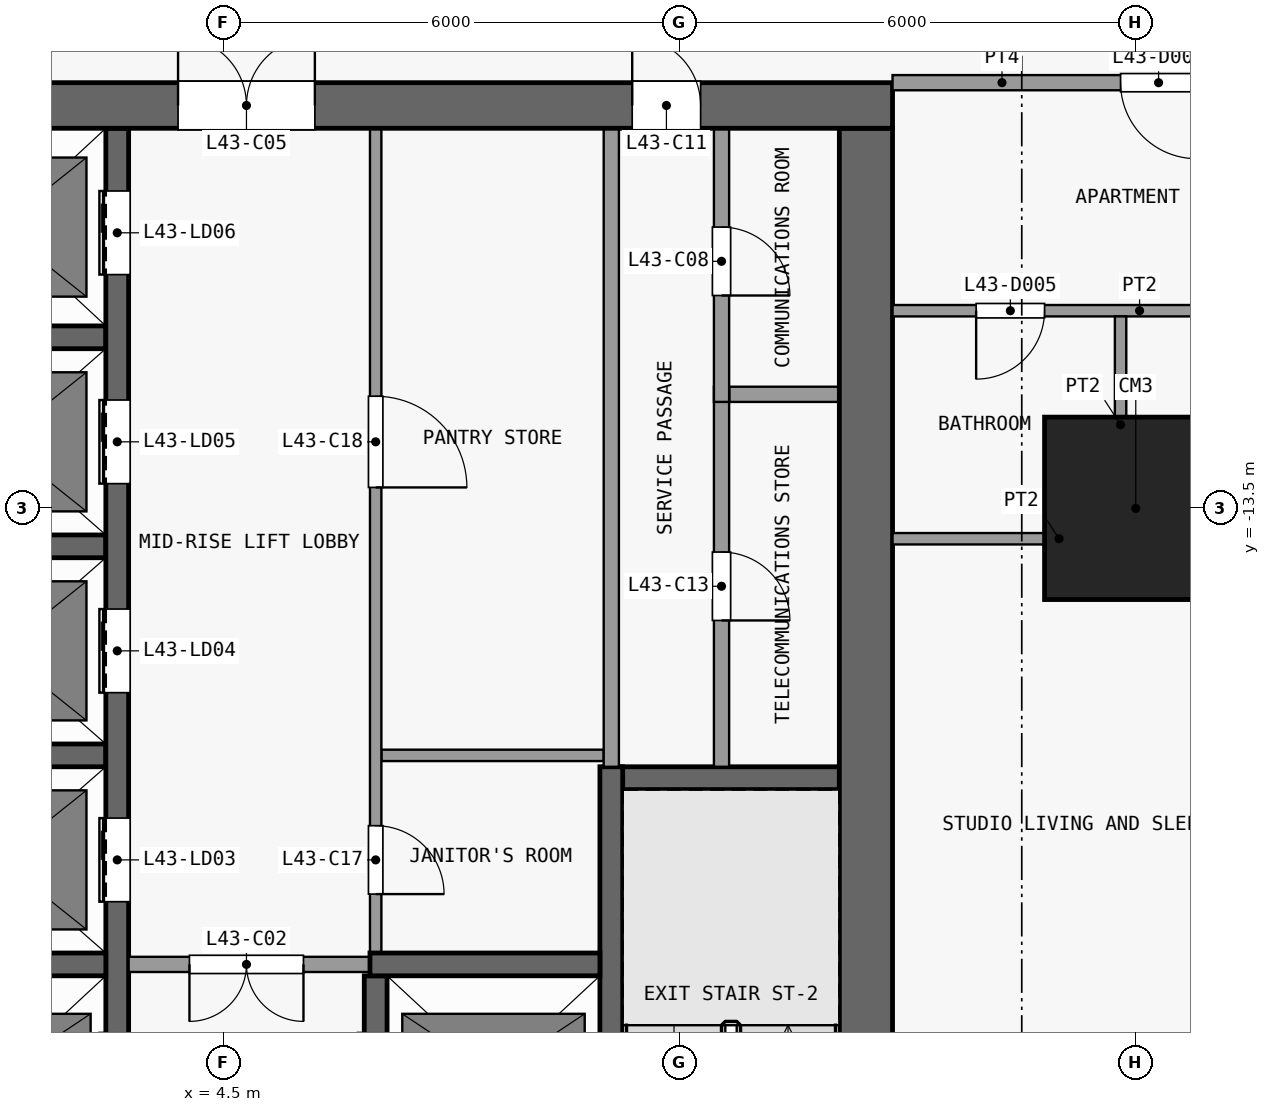
"""IFC4 building model, lengths in metres.
Left out: names, types, materials, properties, quantities, classifications, styles, units other than length and angle.
Written with IfcOpenShell. Run it as: python <this file> out.ifc"""

import sys

from ifc_helpers import new_model, si_unit, direction, frame, frame_2d, origin, origin_2d, place, context, subcontext, project, spatial, rectangle, extrude, element, fill, save


model = new_model("IFC4")
c1 = context("Model", 3, precision=1e-05, world=origin(), true_north=direction((0.0, 1.0)))
c2 = subcontext(c1, "Body", "Model", "MODEL_VIEW")
j1 = project(units=[si_unit("LENGTHUNIT", "METRE"), si_unit("PLANEANGLEUNIT", "RADIAN")], contexts=[c1])
p1 = place(None, origin())
s1 = spatial("IfcSite", under=j1, at=p1, CompositionType="ELEMENT")
p2 = place(p1, origin())
s2 = spatial("IfcBuilding", under=s1, at=p2, CompositionType="ELEMENT")
p3 = place(p2, frame((0.0, 0.0, 174.5)))
s3 = spatial("IfcBuildingStorey", under=s2, at=p3, CompositionType="ELEMENT", Elevation=174.5)
p4 = place(p3, frame((16.5, -13.5, 0.0), z_axis=(0.0, 0.0, 1.0), x_axis=(1.0, 0.0, 0.0)))
e1 = element("IfcColumn", 1, at=p4, inside=s3, PredefinedType="COLUMN", context=c2, shape_type="SweptSolid", body=[
    extrude(rectangle(XDim=2.4, YDim=2.4, at=origin_2d()), origin(), (0.0, 0.0, 1.0), 3.6),
])
p5 = place(p3, frame((-13.3, -8.2, 0.0), z_axis=(0.0, 0.0, 1.0), x_axis=(1.0, 0.0, 0.0)))
e2 = element("IfcWall", 2, at=p5, inside=s3, PredefinedType="SHEAR", context=c2, shape_type="SweptSolid", body=[
    extrude(rectangle(XDim=26.6, YDim=0.6, at=frame_2d((13.3, 0.0))), origin(), (0.0, 0.0, 1.0), 3.3),
])
p6 = place(p5, frame((7.6, 0.0, 0.0)))
e3 = element("IfcOpeningElement", 3, at=p6, cuts=e2, PredefinedType="OPENING", context=c2, shape_type="SweptSolid", body=[
    extrude(rectangle(XDim=1.8, YDim=2.1, at=frame_2d((0.9, 1.05))), frame((0.0, 0.31, 0.0), z_axis=(0.0, -1.0, 0.0), x_axis=(1.0, 0.0, 0.0)), (0.0, 0.0, 1.0), 0.62),
])
p7 = place(p5, frame((17.2, 0.0, 0.0)))
e4 = element("IfcOpeningElement", 4, at=p7, cuts=e2, PredefinedType="OPENING", context=c2, shape_type="SweptSolid", body=[
    extrude(rectangle(XDim=1.8, YDim=2.1, at=frame_2d((0.9, 1.05))), frame((0.0, 0.31, 0.0), z_axis=(0.0, -1.0, 0.0), x_axis=(1.0, 0.0, 0.0)), (0.0, 0.0, 1.0), 0.62),
])
p8 = place(p5, frame((2.525, 0.0, 0.0)))
e5 = element("IfcOpeningElement", 5, at=p8, cuts=e2, PredefinedType="OPENING", context=c2, shape_type="SweptSolid", body=[
    extrude(rectangle(XDim=0.9, YDim=2.1, at=frame_2d((0.45, 1.05))), frame((0.0, 0.31, 0.0), z_axis=(0.0, -1.0, 0.0), x_axis=(1.0, 0.0, 0.0)), (0.0, 0.0, 1.0), 0.62),
])
p9 = place(p5, frame((23.175, 0.0, 0.0)))
e6 = element("IfcOpeningElement", 6, at=p9, cuts=e2, PredefinedType="OPENING", context=c2, shape_type="SweptSolid", body=[
    extrude(rectangle(XDim=0.9, YDim=2.1, at=frame_2d((0.45, 1.05))), frame((0.0, 0.31, 0.0), z_axis=(0.0, -1.0, 0.0), x_axis=(1.0, 0.0, 0.0)), (0.0, 0.0, 1.0), 0.62),
])
p10 = place(p3, frame((12.95, -24.6, 0.0), z_axis=(0.0, 0.0, 1.0), x_axis=(0.0, 1.0, 0.0)))
e7 = element("IfcWall", 7, at=p10, inside=s3, PredefinedType="SHEAR", context=c2, shape_type="SweptSolid", body=[
    extrude(rectangle(XDim=16.1, YDim=0.7, at=frame_2d((8.05, 0.0))), origin(), (0.0, 0.0, 1.0), 3.3),
])
p11 = place(p3, frame((0.15, -19.5, 0.0), z_axis=(0.0, 0.0, 1.0), x_axis=(1.0, 0.0, 0.0)))
e8 = element("IfcWall", 8, at=p11, inside=s3, PredefinedType="SHEAR", context=c2, shape_type="SweptSolid", body=[
    extrude(rectangle(XDim=2.8, YDim=0.3, at=frame_2d((1.4, 0.0))), origin(), (0.0, 0.0, 1.0), 3.3),
])
p12 = place(p3, frame((6.575, -19.5, 0.0), z_axis=(0.0, 0.0, 1.0), x_axis=(-1.0, 0.0, 0.0)))
e9 = element("IfcWall", 9, at=p12, inside=s3, PredefinedType="PARTITIONING", context=c2, shape_type="SweptSolid", body=[
    extrude(rectangle(XDim=3.325, YDim=0.2, at=frame_2d((1.663, 0.0))), origin(), (0.0, 0.0, 1.0), 3.3),
])
p13 = place(p12, frame((1.025, 0.0, 0.0)))
e10 = element("IfcOpeningElement", 10, at=p13, cuts=e9, PredefinedType="OPENING", context=c2, shape_type="SweptSolid", body=[
    extrude(rectangle(XDim=1.5, YDim=2.1, at=frame_2d((0.75, 1.05))), frame((0.0, 0.11, 0.0), z_axis=(0.0, -1.0, 0.0), x_axis=(1.0, 0.0, 0.0)), (0.0, 0.0, 1.0), 0.22),
])
p14 = place(p3, frame((6.425, -19.5, 0.0), z_axis=(0.0, 0.0, 1.0), x_axis=(1.0, 0.0, 0.0)))
e11 = element("IfcWall", 11, at=p14, inside=s3, PredefinedType="SHEAR", context=c2, shape_type="SweptSolid", body=[
    extrude(rectangle(XDim=3.025, YDim=0.3, at=frame_2d((1.512, 0.0))), origin(), (0.0, 0.0, 1.0), 3.3),
])
p15 = place(p3, frame((9.5, -17.05, 0.0), z_axis=(0.0, 0.0, 1.0), x_axis=(1.0, 0.0, 0.0)))
e12 = element("IfcWall", 12, at=p15, inside=s3, PredefinedType="SHEAR", context=c2, shape_type="SweptSolid", body=[
    extrude(rectangle(XDim=3.1, YDim=0.3, at=frame_2d((1.55, 0.0))), origin(), (0.0, 0.0, 1.0), 3.3),
])
p16 = place(p3, frame((0.15, -16.75, 0.0), z_axis=(0.0, 0.0, 1.0), x_axis=(1.0, 0.0, 0.0)))
e13 = element("IfcWall", 13, at=p16, inside=s3, PredefinedType="SHEAR", context=c2, shape_type="SweptSolid", body=[
    extrude(rectangle(XDim=2.8, YDim=0.3, at=frame_2d((1.4, 0.0))), origin(), (0.0, 0.0, 1.0), 3.3),
])
p17 = place(p3, frame((6.575, -16.75, 0.0), z_axis=(0.0, 0.0, 1.0), x_axis=(1.0, 0.0, 0.0)))
e14 = element("IfcWall", 14, at=p17, inside=s3, PredefinedType="PARTITIONING", context=c2, shape_type="SweptSolid", body=[
    extrude(rectangle(XDim=2.925, YDim=0.15, at=frame_2d((1.462, 0.0))), origin(), (0.0, 0.0, 1.0), 3.3),
])
p18 = place(p3, frame((0.15, -14.0, 0.0), z_axis=(0.0, 0.0, 1.0), x_axis=(1.0, 0.0, 0.0)))
e15 = element("IfcWall", 15, at=p18, inside=s3, PredefinedType="SHEAR", context=c2, shape_type="SweptSolid", body=[
    extrude(rectangle(XDim=2.8, YDim=0.3, at=frame_2d((1.4, 0.0))), origin(), (0.0, 0.0, 1.0), 3.3),
])
p19 = place(p3, frame((11.15, -12.0, 0.0), z_axis=(0.0, 0.0, 1.0), x_axis=(1.0, 0.0, 0.0)))
e16 = element("IfcWall", 16, at=p19, inside=s3, PredefinedType="PARTITIONING", context=c2, shape_type="SweptSolid", body=[
    extrude(rectangle(XDim=1.45, YDim=0.2, at=frame_2d((0.725, 0.0))), origin(), (0.0, 0.0, 1.0), 3.3),
])
p20 = place(p3, frame((0.15, -11.25, 0.0), z_axis=(0.0, 0.0, 1.0), x_axis=(1.0, 0.0, 0.0)))
e17 = element("IfcWall", 17, at=p20, inside=s3, PredefinedType="SHEAR", context=c2, shape_type="SweptSolid", body=[
    extrude(rectangle(XDim=2.8, YDim=0.3, at=frame_2d((1.4, 0.0))), origin(), (0.0, 0.0, 1.0), 3.3),
])
p21 = place(p3, frame((3.1, -22.55, 0.0), z_axis=(0.0, 0.0, 1.0), x_axis=(0.0, 1.0, 0.0)))
e18 = element("IfcWall", 18, at=p21, inside=s3, PredefinedType="SHEAR", context=c2, shape_type="SweptSolid", body=[
    extrude(rectangle(XDim=14.05, YDim=0.3, at=frame_2d((7.025, 0.0))), origin(), (0.0, 0.0, 1.0), 3.3),
])
p22 = place(p21, frame((1.05, 0.0, 0.0)))
e19 = element("IfcOpeningElement", 19, at=p22, cuts=e18, PredefinedType="OPENING", context=c2, shape_type="SweptSolid", body=[
    extrude(rectangle(XDim=1.1, YDim=2.1, at=frame_2d((0.55, 1.05))), frame((0.0, 0.16, 0.0), z_axis=(0.0, -1.0, 0.0), x_axis=(1.0, 0.0, 0.0)), (0.0, 0.0, 1.0), 0.32),
])
p23 = place(p21, frame((3.875, 0.0, 0.0)))
e20 = element("IfcOpeningElement", 20, at=p23, cuts=e18, PredefinedType="OPENING", context=c2, shape_type="SweptSolid", body=[
    extrude(rectangle(XDim=1.1, YDim=2.1, at=frame_2d((0.55, 1.05))), frame((0.0, 0.16, 0.0), z_axis=(0.0, -1.0, 0.0), x_axis=(1.0, 0.0, 0.0)), (0.0, 0.0, 1.0), 0.32),
])
p24 = place(p21, frame((6.625, 0.0, 0.0)))
e21 = element("IfcOpeningElement", 21, at=p24, cuts=e18, PredefinedType="OPENING", context=c2, shape_type="SweptSolid", body=[
    extrude(rectangle(XDim=1.1, YDim=2.1, at=frame_2d((0.55, 1.05))), frame((0.0, 0.16, 0.0), z_axis=(0.0, -1.0, 0.0), x_axis=(1.0, 0.0, 0.0)), (0.0, 0.0, 1.0), 0.32),
])
p25 = place(p21, frame((9.375, 0.0, 0.0)))
e22 = element("IfcOpeningElement", 22, at=p25, cuts=e18, PredefinedType="OPENING", context=c2, shape_type="SweptSolid", body=[
    extrude(rectangle(XDim=1.1, YDim=2.1, at=frame_2d((0.55, 1.05))), frame((0.0, 0.16, 0.0), z_axis=(0.0, -1.0, 0.0), x_axis=(1.0, 0.0, 0.0)), (0.0, 0.0, 1.0), 0.32),
])
p26 = place(p21, frame((12.125, 0.0, 0.0)))
e23 = element("IfcOpeningElement", 23, at=p26, cuts=e18, PredefinedType="OPENING", context=c2, shape_type="SweptSolid", body=[
    extrude(rectangle(XDim=1.1, YDim=2.1, at=frame_2d((0.55, 1.05))), frame((0.0, 0.16, 0.0), z_axis=(0.0, -1.0, 0.0), x_axis=(1.0, 0.0, 0.0)), (0.0, 0.0, 1.0), 0.32),
])
p27 = place(p3, frame((6.5, -22.25, 0.0), z_axis=(0.0, 0.0, 1.0), x_axis=(0.0, 1.0, 0.0)))
e24 = element("IfcWall", 24, at=p27, inside=s3, PredefinedType="SHEAR", context=c2, shape_type="SweptSolid", body=[
    extrude(rectangle(XDim=2.6, YDim=0.3, at=frame_2d((1.3, 0.0))), origin(), (0.0, 0.0, 1.0), 3.3),
])
p28 = place(p27, frame((0.75, 0.0, 0.0)))
e25 = element("IfcOpeningElement", 25, at=p28, cuts=e24, PredefinedType="OPENING", context=c2, shape_type="SweptSolid", body=[
    extrude(rectangle(XDim=1.1, YDim=2.1, at=frame_2d((0.55, 1.05))), frame((0.0, 0.16, 0.0), z_axis=(0.0, -1.0, 0.0), x_axis=(1.0, 0.0, 0.0)), (0.0, 0.0, 1.0), 0.32),
])
p29 = place(p3, frame((6.5, -8.5, 0.0), z_axis=(0.0, 0.0, 1.0), x_axis=(0.0, -1.0, 0.0)))
e26 = element("IfcWall", 26, at=p29, inside=s3, PredefinedType="PARTITIONING", context=c2, shape_type="SweptSolid", body=[
    extrude(rectangle(XDim=10.85, YDim=0.15, at=frame_2d((5.425, 0.0))), origin(), (0.0, 0.0, 1.0), 3.3),
])
p30 = place(p29, frame((9.175, 0.0, 0.0)))
e27 = element("IfcOpeningElement", 27, at=p30, cuts=e26, PredefinedType="OPENING", context=c2, shape_type="SweptSolid", body=[
    extrude(rectangle(XDim=0.9, YDim=2.1, at=frame_2d((0.45, 1.05))), frame((0.0, 0.085, 0.0), z_axis=(0.0, -1.0, 0.0), x_axis=(1.0, 0.0, 0.0)), (0.0, 0.0, 1.0), 0.17),
])
p31 = place(p29, frame((3.525, 0.0, 0.0)))
e28 = element("IfcOpeningElement", 28, at=p31, cuts=e26, PredefinedType="OPENING", context=c2, shape_type="SweptSolid", body=[
    extrude(rectangle(XDim=1.2, YDim=2.1, at=frame_2d((0.6, 1.05))), frame((0.0, 0.085, 0.0), z_axis=(0.0, -1.0, 0.0), x_axis=(1.0, 0.0, 0.0)), (0.0, 0.0, 1.0), 0.17),
])
p32 = place(p3, frame((9.6, -16.9, 0.0), z_axis=(0.0, 0.0, 1.0), x_axis=(0.0, -1.0, 0.0)))
e29 = element("IfcWall", 29, at=p32, inside=s3, PredefinedType="SHEAR", context=c2, shape_type="SweptSolid", body=[
    extrude(rectangle(XDim=7.7, YDim=0.3, at=frame_2d((3.85, 0.0))), origin(), (0.0, 0.0, 1.0), 3.3),
])
p33 = place(p32, frame((6.5, 0.0, 0.0)))
e30 = element("IfcOpeningElement", 30, at=p33, cuts=e29, PredefinedType="OPENING", context=c2, shape_type="SweptSolid", body=[
    extrude(rectangle(XDim=1.1, YDim=2.1, at=frame_2d((0.55, 1.05))), frame((0.0, 0.16, 0.0), z_axis=(0.0, -1.0, 0.0), x_axis=(1.0, 0.0, 0.0)), (0.0, 0.0, 1.0), 0.32),
])
p34 = place(p3, frame((9.6, -16.9, 0.0), z_axis=(0.0, 0.0, 1.0), x_axis=(0.0, 1.0, 0.0)))
e31 = element("IfcWall", 31, at=p34, inside=s3, PredefinedType="PARTITIONING", context=c2, shape_type="SweptSolid", body=[
    extrude(rectangle(XDim=8.4, YDim=0.2, at=frame_2d((4.2, 0.0))), origin(), (0.0, 0.0, 1.0), 3.3),
])
p35 = place(p3, frame((11.05, -11.9, 0.0), z_axis=(0.0, 0.0, 1.0), x_axis=(0.0, -1.0, 0.0)))
e32 = element("IfcWall", 32, at=p35, inside=s3, PredefinedType="PARTITIONING", context=c2, shape_type="SweptSolid", body=[
    extrude(rectangle(XDim=5.0, YDim=0.2, at=frame_2d((2.5, 0.0))), origin(), (0.0, 0.0, 1.0), 3.3),
])
p36 = place(p35, frame((2.175, 0.0, 0.0)))
e33 = element("IfcOpeningElement", 33, at=p36, cuts=e32, PredefinedType="OPENING", context=c2, shape_type="SweptSolid", body=[
    extrude(rectangle(XDim=0.9, YDim=2.1, at=frame_2d((0.45, 1.05))), frame((0.0, 0.11, 0.0), z_axis=(0.0, -1.0, 0.0), x_axis=(1.0, 0.0, 0.0)), (0.0, 0.0, 1.0), 0.22),
])
p37 = place(p3, frame((11.05, -8.5, 0.0), z_axis=(0.0, 0.0, 1.0), x_axis=(0.0, -1.0, 0.0)))
e34 = element("IfcWall", 34, at=p37, inside=s3, PredefinedType="PARTITIONING", context=c2, shape_type="SweptSolid", body=[
    extrude(rectangle(XDim=3.6, YDim=0.2, at=frame_2d((1.8, 0.0))), origin(), (0.0, 0.0, 1.0), 3.3),
])
p38 = place(p37, frame((1.3, 0.0, 0.0)))
e35 = element("IfcOpeningElement", 35, at=p38, cuts=e34, PredefinedType="OPENING", context=c2, shape_type="SweptSolid", body=[
    extrude(rectangle(XDim=0.9, YDim=2.1, at=frame_2d((0.45, 1.05))), frame((0.0, 0.11, 0.0), z_axis=(0.0, -1.0, 0.0), x_axis=(1.0, 0.0, 0.0)), (0.0, 0.0, 1.0), 0.22),
])
p39 = place(p3, frame((13.3, -13.9, 0.0), z_axis=(0.0, 0.0, 1.0), x_axis=(1.0, 0.0, 0.0)))
e36 = element("IfcWall", 36, at=p39, inside=s3, PredefinedType="PARTITIONING", context=c2, shape_type="SweptSolid", body=[
    extrude(rectangle(XDim=5.962, YDim=0.15, at=frame_2d((2.981, 0.0))), origin(), (0.0, 0.0, 1.0), 3.3),
])
p40 = place(p39, frame((4.5, 0.0, 0.0)))
e37 = element("IfcOpeningElement", 37, at=p40, cuts=e36, PredefinedType="OPENING", context=c2, shape_type="SweptSolid", body=[
    extrude(rectangle(XDim=0.9, YDim=2.1, at=frame_2d((0.45, 1.05))), frame((0.0, 0.085, 0.0), z_axis=(0.0, -1.0, 0.0), x_axis=(1.0, 0.0, 0.0)), (0.0, 0.0, 1.0), 0.17),
])
p41 = place(p3, frame((13.3, -10.9, 0.0), z_axis=(0.0, 0.0, 1.0), x_axis=(1.0, 0.0, 0.0)))
e38 = element("IfcWall", 38, at=p41, inside=s3, PredefinedType="PARTITIONING", context=c2, shape_type="SweptSolid", body=[
    extrude(rectangle(XDim=6.863, YDim=0.15, at=frame_2d((3.431, 0.0))), origin(), (0.0, 0.0, 1.0), 3.3),
])
p42 = place(p41, frame((1.1, 0.0, 0.0)))
e39 = element("IfcOpeningElement", 39, at=p42, cuts=e38, PredefinedType="OPENING", context=c2, shape_type="SweptSolid", body=[
    extrude(rectangle(XDim=0.9, YDim=2.1, at=frame_2d((0.45, 1.05))), frame((0.0, 0.085, 0.0), z_axis=(0.0, -1.0, 0.0), x_axis=(1.0, 0.0, 0.0)), (0.0, 0.0, 1.0), 0.17),
])
p43 = place(p41, frame((4.5, 0.0, 0.0)))
e40 = element("IfcOpeningElement", 40, at=p43, cuts=e38, PredefinedType="OPENING", context=c2, shape_type="SweptSolid", body=[
    extrude(rectangle(XDim=0.9, YDim=2.1, at=frame_2d((0.45, 1.05))), frame((0.0, 0.085, 0.0), z_axis=(0.0, -1.0, 0.0), x_axis=(1.0, 0.0, 0.0)), (0.0, 0.0, 1.0), 0.17),
])
p44 = place(p3, frame((13.3, -7.9, 0.0), z_axis=(0.0, 0.0, 1.0), x_axis=(1.0, 0.0, 0.0)))
e41 = element("IfcWall", 41, at=p44, inside=s3, PredefinedType="PARTITIONING", context=c2, shape_type="SweptSolid", body=[
    extrude(rectangle(XDim=6.863, YDim=0.2, at=frame_2d((3.431, 0.0))), origin(), (0.0, 0.0, 1.0), 3.3),
])
p45 = place(p44, frame((3.0, 0.0, 0.0)))
e42 = element("IfcOpeningElement", 42, at=p45, cuts=e41, PredefinedType="OPENING", context=c2, shape_type="SweptSolid", body=[
    extrude(rectangle(XDim=1.0, YDim=2.1, at=frame_2d((0.5, 1.05))), frame((0.0, 0.11, 0.0), z_axis=(0.0, -1.0, 0.0), x_axis=(1.0, 0.0, 0.0)), (0.0, 0.0, 1.0), 0.22),
])
p46 = place(p3, frame((16.3, -13.825, 0.0), z_axis=(0.0, 0.0, 1.0), x_axis=(0.0, 1.0, 0.0)))
e43 = element("IfcWall", 43, at=p46, inside=s3, PredefinedType="PARTITIONING", context=c2, shape_type="SweptSolid", body=[
    extrude(rectangle(XDim=2.85, YDim=0.15, at=frame_2d((1.425, 0.0))), origin(), (0.0, 0.0, 1.0), 3.3),
])
p47 = place(p23, origin())
e44 = element("IfcDoor", 44, at=p47, inside=s3, OperationType="DOUBLE_DOOR_SLIDING", PredefinedType="DOOR", context=c2, shape_type="SweptSolid", body=[
    extrude(rectangle(XDim=1.1, YDim=2.1, at=frame_2d((0.55, 1.05))), frame((0.0, 0.025, 0.0), z_axis=(0.0, -1.0, 0.0), x_axis=(1.0, 0.0, 0.0)), (0.0, 0.0, 1.0), 0.05),
])
fill(e20, e44)
p48 = place(p24, origin())
e45 = element("IfcDoor", 45, at=p48, inside=s3, OperationType="DOUBLE_DOOR_SLIDING", PredefinedType="DOOR", context=c2, shape_type="SweptSolid", body=[
    extrude(rectangle(XDim=1.1, YDim=2.1, at=frame_2d((0.55, 1.05))), frame((0.0, 0.025, 0.0), z_axis=(0.0, -1.0, 0.0), x_axis=(1.0, 0.0, 0.0)), (0.0, 0.0, 1.0), 0.05),
])
fill(e21, e45)
p49 = place(p25, origin())
e46 = element("IfcDoor", 46, at=p49, inside=s3, OperationType="DOUBLE_DOOR_SLIDING", PredefinedType="DOOR", context=c2, shape_type="SweptSolid", body=[
    extrude(rectangle(XDim=1.1, YDim=2.1, at=frame_2d((0.55, 1.05))), frame((0.0, 0.025, 0.0), z_axis=(0.0, -1.0, 0.0), x_axis=(1.0, 0.0, 0.0)), (0.0, 0.0, 1.0), 0.05),
])
fill(e22, e46)
p50 = place(p26, origin())
e47 = element("IfcDoor", 47, at=p50, inside=s3, OperationType="DOUBLE_DOOR_SLIDING", PredefinedType="DOOR", context=c2, shape_type="SweptSolid", body=[
    extrude(rectangle(XDim=1.1, YDim=2.1, at=frame_2d((0.55, 1.05))), frame((0.0, 0.025, 0.0), z_axis=(0.0, -1.0, 0.0), x_axis=(1.0, 0.0, 0.0)), (0.0, 0.0, 1.0), 0.05),
])
fill(e23, e47)
p51 = place(p13, origin())
e48 = element("IfcDoor", 48, at=p51, inside=s3, OperationType="DOUBLE_DOOR_SINGLE_SWING", PredefinedType="DOOR", context=c2, shape_type="SweptSolid", body=[
    extrude(rectangle(XDim=1.5, YDim=2.1, at=frame_2d((0.75, 1.05))), frame((0.0, 0.025, 0.0), z_axis=(0.0, -1.0, 0.0), x_axis=(1.0, 0.0, 0.0)), (0.0, 0.0, 1.0), 0.05),
])
fill(e10, e48)
p52 = place(p7, origin())
e49 = element("IfcDoor", 49, at=p52, inside=s3, OperationType="DOUBLE_DOOR_SINGLE_SWING", PredefinedType="DOOR", context=c2, shape_type="SweptSolid", body=[
    extrude(rectangle(XDim=1.8, YDim=2.1, at=frame_2d((0.9, 1.05))), frame((0.0, 0.025, 0.0), z_axis=(0.0, -1.0, 0.0), x_axis=(1.0, 0.0, 0.0)), (0.0, 0.0, 1.0), 0.05),
])
fill(e4, e49)
p53 = place(p38, origin())
e50 = element("IfcDoor", 50, at=p53, inside=s3, OperationType="SINGLE_SWING_RIGHT", PredefinedType="DOOR", context=c2, shape_type="SweptSolid", body=[
    extrude(rectangle(XDim=0.9, YDim=2.1, at=frame_2d((0.45, 1.05))), frame((0.0, 0.025, 0.0), z_axis=(0.0, -1.0, 0.0), x_axis=(1.0, 0.0, 0.0)), (0.0, 0.0, 1.0), 0.05),
])
fill(e35, e50)
p54 = place(p9, origin())
e51 = element("IfcDoor", 51, at=p54, inside=s3, OperationType="SINGLE_SWING_LEFT", PredefinedType="DOOR", context=c2, shape_type="SweptSolid", body=[
    extrude(rectangle(XDim=0.9, YDim=2.1, at=frame_2d((0.45, 1.05))), frame((0.0, 0.025, 0.0), z_axis=(0.0, -1.0, 0.0), x_axis=(1.0, 0.0, 0.0)), (0.0, 0.0, 1.0), 0.05),
])
fill(e6, e51)
p55 = place(p36, origin())
e52 = element("IfcDoor", 52, at=p55, inside=s3, OperationType="SINGLE_SWING_RIGHT", PredefinedType="DOOR", context=c2, shape_type="SweptSolid", body=[
    extrude(rectangle(XDim=0.9, YDim=2.1, at=frame_2d((0.45, 1.05))), frame((0.0, 0.025, 0.0), z_axis=(0.0, -1.0, 0.0), x_axis=(1.0, 0.0, 0.0)), (0.0, 0.0, 1.0), 0.05),
])
fill(e33, e52)
p56 = place(p30, origin())
e53 = element("IfcDoor", 53, at=p56, inside=s3, OperationType="SINGLE_SWING_RIGHT", PredefinedType="DOOR", context=c2, shape_type="SweptSolid", body=[
    extrude(rectangle(XDim=0.9, YDim=2.1, at=frame_2d((0.45, 1.05))), frame((0.0, 0.025, 0.0), z_axis=(0.0, -1.0, 0.0), x_axis=(1.0, 0.0, 0.0)), (0.0, 0.0, 1.0), 0.05),
])
fill(e27, e53)
p57 = place(p31, origin())
e54 = element("IfcDoor", 54, at=p57, inside=s3, OperationType="SINGLE_SWING_RIGHT", PredefinedType="DOOR", context=c2, shape_type="SweptSolid", body=[
    extrude(rectangle(XDim=1.2, YDim=2.1, at=frame_2d((0.6, 1.05))), frame((0.0, 0.025, 0.0), z_axis=(0.0, -1.0, 0.0), x_axis=(1.0, 0.0, 0.0)), (0.0, 0.0, 1.0), 0.05),
])
fill(e28, e54)
p58 = place(p42, origin())
e55 = element("IfcDoor", 55, at=p58, inside=s3, OperationType="SINGLE_SWING_LEFT", PredefinedType="DOOR", context=c2, shape_type="SweptSolid", body=[
    extrude(rectangle(XDim=0.9, YDim=2.1, at=frame_2d((0.45, 1.05))), frame((0.0, 0.025, 0.0), z_axis=(0.0, -1.0, 0.0), x_axis=(1.0, 0.0, 0.0)), (0.0, 0.0, 1.0), 0.05),
])
fill(e39, e55)
p59 = place(p45, origin())
e56 = element("IfcDoor", 56, at=p59, inside=s3, OperationType="SINGLE_SWING_RIGHT", PredefinedType="DOOR", context=c2, shape_type="SweptSolid", body=[
    extrude(rectangle(XDim=1.0, YDim=2.1, at=frame_2d((0.5, 1.05))), frame((0.0, 0.025, 0.0), z_axis=(0.0, -1.0, 0.0), x_axis=(1.0, 0.0, 0.0)), (0.0, 0.0, 1.0), 0.05),
])
fill(e42, e56)
save(model, sys.argv[1])
